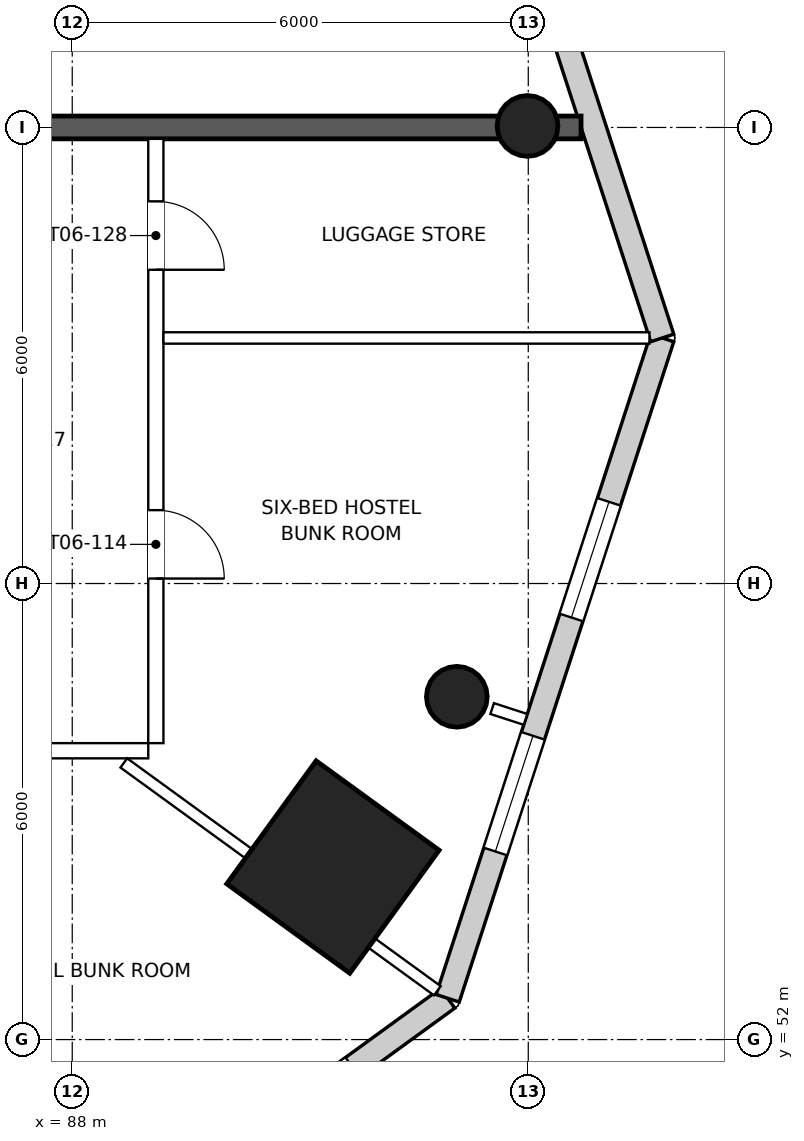
"""IFC4 building model, lengths in metres.
Left out: names, types, materials, properties, quantities, classifications, styles, units other than length and angle.
Written with IfcOpenShell. Run it as: python <this file> out.ifc"""

import sys

from ifc_helpers import new_model, si_unit, direction, frame, frame_2d, origin, origin_2d, place, context, subcontext, project, spatial, rectangle, circle, extrude, element, fill, save


model = new_model("IFC4")
c1 = context("Model", 3, precision=1e-05, world=origin(), true_north=direction((0.0, 1.0)))
c2 = subcontext(c1, "Body", "Model", "MODEL_VIEW")
j1 = project(units=[si_unit("LENGTHUNIT", "METRE"), si_unit("PLANEANGLEUNIT", "RADIAN")], contexts=[c1])
p1 = place(None, origin())
s1 = spatial("IfcSite", under=j1, at=p1, CompositionType="ELEMENT")
p2 = place(p1, origin())
s2 = spatial("IfcBuilding", under=s1, at=p2, CompositionType="ELEMENT")
p3 = place(p2, frame((0.0, 0.0, 98.6)))
s3 = spatial("IfcBuildingStorey", under=s2, at=p3, CompositionType="ELEMENT", Elevation=98.6)
p4 = place(p3, frame((91.43, 54.27, 0.0), z_axis=(0.0, 0.0, 1.0), x_axis=(0.809016994375, -0.587785252292, 0.0)))
e1 = element("IfcColumn", 1, at=p4, inside=s3, PredefinedType="COLUMN", context=c2, shape_type="SweptSolid", body=[
    extrude(rectangle(XDim=2.0, YDim=2.0, at=origin_2d()), origin(), (0.0, 0.0, 1.0), 3.9),
])
for number, where, z_axis, x_axis in (
    (2, (93.06, 56.51, 0.0), (0.0, 0.0, 1.0), (1.0, 0.0, 0.0)),
    (3, (93.99, 64.02, 0.0), (0.0, 0.0, 1.0), (1.0, 0.0, 0.0)),
):
    element("IfcColumn", number, at=place(p3, frame(where, z_axis=z_axis, x_axis=x_axis)), inside=s3, PredefinedType="COLUMN", context=c2, shape_type="SweptSolid", body=[
        extrude(circle(Radius=0.4, at=origin_2d()), origin(), (0.0, 0.0, 1.0), 3.9),
    ])
p5 = place(p3, frame((74.663, 39.264, 0.0), z_axis=(0.0, 0.0, 1.0), x_axis=(0.809012643171, 0.587791241165, 0.0)))
e4 = element("IfcWall", 4, at=p5, inside=s3, PredefinedType="SOLIDWALL", context=c2, shape_type="SweptSolid", body=[
    extrude(rectangle(XDim=22.592, YDim=0.32, at=frame_2d((11.296, 0.0))), origin(), (0.0, 0.0, 1.0), 3.6),
])
p6 = place(p5, frame((1.546, 0.0, 0.9)))
e5 = element("IfcOpeningElement", 5, at=p6, cuts=e4, PredefinedType="OPENING", context=c2, shape_type="SweptSolid", body=[
    extrude(rectangle(XDim=1.5, YDim=1.8, at=frame_2d((0.75, 0.9))), frame((0.0, 0.17, 0.0), z_axis=(0.0, -1.0, 0.0), x_axis=(1.0, 0.0, 0.0)), (0.0, 0.0, 1.0), 0.34),
])
p7 = place(p5, frame((4.546, 0.0, 0.9)))
e6 = element("IfcOpeningElement", 6, at=p7, cuts=e4, PredefinedType="OPENING", context=c2, shape_type="SweptSolid", body=[
    extrude(rectangle(XDim=1.5, YDim=1.8, at=frame_2d((0.75, 0.9))), frame((0.0, 0.17, 0.0), z_axis=(0.0, -1.0, 0.0), x_axis=(1.0, 0.0, 0.0)), (0.0, 0.0, 1.0), 0.34),
])
p8 = place(p5, frame((7.546, 0.0, 0.9)))
e7 = element("IfcOpeningElement", 7, at=p8, cuts=e4, PredefinedType="OPENING", context=c2, shape_type="SweptSolid", body=[
    extrude(rectangle(XDim=1.5, YDim=1.8, at=frame_2d((0.75, 0.9))), frame((0.0, 0.17, 0.0), z_axis=(0.0, -1.0, 0.0), x_axis=(1.0, 0.0, 0.0)), (0.0, 0.0, 1.0), 0.34),
])
p9 = place(p5, frame((10.546, 0.0, 0.9)))
e8 = element("IfcOpeningElement", 8, at=p9, cuts=e4, PredefinedType="OPENING", context=c2, shape_type="SweptSolid", body=[
    extrude(rectangle(XDim=1.5, YDim=1.8, at=frame_2d((0.75, 0.9))), frame((0.0, 0.17, 0.0), z_axis=(0.0, -1.0, 0.0), x_axis=(1.0, 0.0, 0.0)), (0.0, 0.0, 1.0), 0.34),
])
p10 = place(p5, frame((13.546, 0.0, 0.9)))
e9 = element("IfcOpeningElement", 9, at=p10, cuts=e4, PredefinedType="OPENING", context=c2, shape_type="SweptSolid", body=[
    extrude(rectangle(XDim=1.5, YDim=1.8, at=frame_2d((0.75, 0.9))), frame((0.0, 0.17, 0.0), z_axis=(0.0, -1.0, 0.0), x_axis=(1.0, 0.0, 0.0)), (0.0, 0.0, 1.0), 0.34),
])
p11 = place(p5, frame((16.546, 0.0, 0.9)))
e10 = element("IfcOpeningElement", 10, at=p11, cuts=e4, PredefinedType="OPENING", context=c2, shape_type="SweptSolid", body=[
    extrude(rectangle(XDim=1.5, YDim=1.8, at=frame_2d((0.75, 0.9))), frame((0.0, 0.17, 0.0), z_axis=(0.0, -1.0, 0.0), x_axis=(1.0, 0.0, 0.0)), (0.0, 0.0, 1.0), 0.34),
])
p12 = place(p5, frame((19.546, 0.0, 0.9)))
e11 = element("IfcOpeningElement", 11, at=p12, cuts=e4, PredefinedType="OPENING", context=c2, shape_type="SweptSolid", body=[
    extrude(rectangle(XDim=1.5, YDim=1.8, at=frame_2d((0.75, 0.9))), frame((0.0, 0.17, 0.0), z_axis=(0.0, -1.0, 0.0), x_axis=(1.0, 0.0, 0.0)), (0.0, 0.0, 1.0), 0.34),
])
p13 = place(p3, frame((92.94, 52.543, 0.0), z_axis=(0.0, 0.0, 1.0), x_axis=(0.309026240246, 0.95105351208, 0.0)))
e12 = element("IfcWall", 12, at=p13, inside=s3, PredefinedType="SOLIDWALL", context=c2, shape_type="SweptSolid", body=[
    extrude(rectangle(XDim=9.134, YDim=0.32, at=frame_2d((4.567, 0.0))), origin(), (0.0, 0.0, 1.0), 3.6),
])
p14 = place(p13, frame((2.031, 0.0, 0.9)))
e13 = element("IfcOpeningElement", 13, at=p14, cuts=e12, PredefinedType="OPENING", context=c2, shape_type="SweptSolid", body=[
    extrude(rectangle(XDim=1.6, YDim=1.8, at=frame_2d((0.8, 0.9))), frame((0.0, 0.17, 0.0), z_axis=(0.0, -1.0, 0.0), x_axis=(1.0, 0.0, 0.0)), (0.0, 0.0, 1.0), 0.34),
])
p15 = place(p13, frame((5.267, 0.0, 0.9)))
e14 = element("IfcOpeningElement", 14, at=p15, cuts=e12, PredefinedType="OPENING", context=c2, shape_type="SweptSolid", body=[
    extrude(rectangle(XDim=1.6, YDim=1.8, at=frame_2d((0.8, 0.9))), frame((0.0, 0.17, 0.0), z_axis=(0.0, -1.0, 0.0), x_axis=(1.0, 0.0, 0.0)), (0.0, 0.0, 1.0), 0.34),
])
p16 = place(p3, frame((95.762, 61.231, 0.0), z_axis=(0.0, 0.0, 1.0), x_axis=(-0.309018577053, 0.95105600205, 0.0)))
e15 = element("IfcWall", 15, at=p16, inside=s3, PredefinedType="SOLIDWALL", context=c2, shape_type="SweptSolid", body=[
    extrude(rectangle(XDim=22.247, YDim=0.32, at=frame_2d((11.124, 0.0))), origin(), (0.0, 0.0, 1.0), 3.6),
])
p17 = place(p16, frame((4.374, 0.0, 0.9)))
e16 = element("IfcOpeningElement", 16, at=p17, cuts=e15, PredefinedType="OPENING", context=c2, shape_type="SweptSolid", body=[
    extrude(rectangle(XDim=1.5, YDim=1.8, at=frame_2d((0.75, 0.9))), frame((0.0, 0.17, 0.0), z_axis=(0.0, -1.0, 0.0), x_axis=(1.0, 0.0, 0.0)), (0.0, 0.0, 1.0), 0.34),
])
p18 = place(p16, frame((7.374, 0.0, 0.9)))
e17 = element("IfcOpeningElement", 17, at=p18, cuts=e15, PredefinedType="OPENING", context=c2, shape_type="SweptSolid", body=[
    extrude(rectangle(XDim=1.5, YDim=1.8, at=frame_2d((0.75, 0.9))), frame((0.0, 0.17, 0.0), z_axis=(0.0, -1.0, 0.0), x_axis=(1.0, 0.0, 0.0)), (0.0, 0.0, 1.0), 0.34),
])
p19 = place(p16, frame((10.374, 0.0, 0.9)))
e18 = element("IfcOpeningElement", 18, at=p19, cuts=e15, PredefinedType="OPENING", context=c2, shape_type="SweptSolid", body=[
    extrude(rectangle(XDim=1.5, YDim=1.8, at=frame_2d((0.75, 0.9))), frame((0.0, 0.17, 0.0), z_axis=(0.0, -1.0, 0.0), x_axis=(1.0, 0.0, 0.0)), (0.0, 0.0, 1.0), 0.34),
])
p20 = place(p16, frame((13.374, 0.0, 0.9)))
e19 = element("IfcOpeningElement", 19, at=p20, cuts=e15, PredefinedType="OPENING", context=c2, shape_type="SweptSolid", body=[
    extrude(rectangle(XDim=1.5, YDim=1.8, at=frame_2d((0.75, 0.9))), frame((0.0, 0.17, 0.0), z_axis=(0.0, -1.0, 0.0), x_axis=(1.0, 0.0, 0.0)), (0.0, 0.0, 1.0), 0.34),
])
p21 = place(p16, frame((16.374, 0.0, 0.9)))
e20 = element("IfcOpeningElement", 20, at=p21, cuts=e15, PredefinedType="OPENING", context=c2, shape_type="SweptSolid", body=[
    extrude(rectangle(XDim=1.5, YDim=1.8, at=frame_2d((0.75, 0.9))), frame((0.0, 0.17, 0.0), z_axis=(0.0, -1.0, 0.0), x_axis=(1.0, 0.0, 0.0)), (0.0, 0.0, 1.0), 0.34),
])
p22 = place(p16, frame((19.374, 0.0, 0.9)))
e21 = element("IfcOpeningElement", 21, at=p22, cuts=e15, PredefinedType="OPENING", context=c2, shape_type="SweptSolid", body=[
    extrude(rectangle(XDim=1.5, YDim=1.8, at=frame_2d((0.75, 0.9))), frame((0.0, 0.17, 0.0), z_axis=(0.0, -1.0, 0.0), x_axis=(1.0, 0.0, 0.0)), (0.0, 0.0, 1.0), 0.34),
])
p23 = place(p3, frame((45.306, 64.0, 0.0), z_axis=(0.0, 0.0, 1.0), x_axis=(1.0, 0.0, 0.0)))
e22 = element("IfcWall", 22, at=p23, inside=s3, PredefinedType="PARTITIONING", context=c2, shape_type="SweptSolid", body=[
    extrude(rectangle(XDim=49.389, YDim=0.3, at=frame_2d((24.694, 0.0))), origin(), (0.0, 0.0, 1.0), 2.9),
])
p24 = place(p23, frame((16.331, 0.0, 0.0)))
e23 = element("IfcOpeningElement", 23, at=p24, cuts=e22, PredefinedType="OPENING", context=c2, shape_type="SweptSolid", body=[
    extrude(rectangle(XDim=2.0, YDim=2.1, at=frame_2d((1.0, 1.05))), frame((0.0, 0.16, 0.0), z_axis=(0.0, -1.0, 0.0), x_axis=(1.0, 0.0, 0.0)), (0.0, 0.0, 1.0), 0.32),
])
p25 = place(p23, frame((31.058, 0.0, 0.0)))
e24 = element("IfcOpeningElement", 24, at=p25, cuts=e22, PredefinedType="OPENING", context=c2, shape_type="SweptSolid", body=[
    extrude(rectangle(XDim=2.0, YDim=2.1, at=frame_2d((1.0, 1.05))), frame((0.0, 0.16, 0.0), z_axis=(0.0, -1.0, 0.0), x_axis=(1.0, 0.0, 0.0)), (0.0, 0.0, 1.0), 0.32),
])
p26 = place(p3, frame((89.1, 63.85, 0.0), z_axis=(0.0, 0.0, 1.0), x_axis=(0.0, -1.0, 0.0)))
e25 = element("IfcWall", 25, at=p26, inside=s3, PredefinedType="PARTITIONING", context=c2, shape_type="SweptSolid", body=[
    extrude(rectangle(XDim=7.95, YDim=0.2, at=frame_2d((3.975, 0.0))), origin(), (0.0, 0.0, 1.0), 3.6),
])
p27 = place(p26, frame((4.885, 0.0, 0.0)))
e26 = element("IfcOpeningElement", 26, at=p27, cuts=e25, PredefinedType="OPENING", context=c2, shape_type="SweptSolid", body=[
    extrude(rectangle(XDim=0.9, YDim=2.1, at=frame_2d((0.45, 1.05))), frame((0.0, 0.11, 0.0), z_axis=(0.0, -1.0, 0.0), x_axis=(1.0, 0.0, 0.0)), (0.0, 0.0, 1.0), 0.22),
])
p28 = place(p26, frame((0.822, 0.0, 0.0)))
e27 = element("IfcOpeningElement", 27, at=p28, cuts=e25, PredefinedType="OPENING", context=c2, shape_type="SweptSolid", body=[
    extrude(rectangle(XDim=0.9, YDim=2.1, at=frame_2d((0.45, 1.05))), frame((0.0, 0.11, 0.0), z_axis=(0.0, -1.0, 0.0), x_axis=(1.0, 0.0, 0.0)), (0.0, 0.0, 1.0), 0.22),
])
p29 = place(p3, frame((89.0, 55.8, 0.0), z_axis=(0.0, 0.0, 1.0), x_axis=(-1.0, 0.0, 0.0)))
e28 = element("IfcWall", 28, at=p29, inside=s3, PredefinedType="PARTITIONING", context=c2, shape_type="SweptSolid", body=[
    extrude(rectangle(XDim=7.946, YDim=0.2, at=frame_2d((3.973, 0.0))), origin(), (0.0, 0.0, 1.0), 3.0),
])
p30 = place(p29, frame((3.034, 0.0, 0.0)))
e29 = element("IfcOpeningElement", 29, at=p30, cuts=e28, PredefinedType="OPENING", context=c2, shape_type="SweptSolid", body=[
    extrude(rectangle(XDim=0.9, YDim=2.1, at=frame_2d((0.45, 1.05))), frame((0.0, 0.11, 0.0), z_axis=(0.0, -1.0, 0.0), x_axis=(1.0, 0.0, 0.0)), (0.0, 0.0, 1.0), 0.22),
])
p31 = place(p3, frame((92.804, 52.642, 0.0), z_axis=(0.0, 0.0, 1.0), x_axis=(-0.809009310944, 0.587795827483, 0.0)))
e30 = element("IfcWall", 30, at=p31, inside=s3, PredefinedType="PARTITIONING", context=c2, shape_type="SweptSolid", body=[
    extrude(rectangle(XDim=5.099, YDim=0.15, at=frame_2d((2.549, 0.0))), origin(), (0.0, 0.0, 1.0), 3.6),
])
p32 = place(p3, frame((95.594, 61.231, 0.0), z_axis=(0.0, 0.0, 1.0), x_axis=(-1.0, 0.0, 0.0)))
e31 = element("IfcWall", 31, at=p32, inside=s3, PredefinedType="PARTITIONING", context=c2, shape_type="SweptSolid", body=[
    extrude(rectangle(XDim=6.394, YDim=0.15, at=frame_2d((3.197, 0.0))), origin(), (0.0, 0.0, 1.0), 3.1),
])
p33 = place(p3, frame((93.525, 56.355, 0.0), z_axis=(0.0, 0.0, 1.0), x_axis=(0.951037957901, -0.309074105406, 0.0)))
e32 = element("IfcWall", 32, at=p33, inside=s3, PredefinedType="PARTITIONING", context=c2, shape_type="SweptSolid", body=[
    extrude(rectangle(XDim=0.461, YDim=0.15, at=frame_2d((0.231, 0.0))), origin(), (0.0, 0.0, 1.0), 3.6),
])
p34 = place(p14, origin())
e33 = element("IfcWindow", 33, at=p34, inside=s3, PartitioningType="SINGLE_PANEL", PredefinedType="WINDOW", context=c2, shape_type="SweptSolid", body=[
    extrude(rectangle(XDim=1.6, YDim=1.8, at=frame_2d((0.8, 0.9))), frame((0.0, 0.07, 0.0), z_axis=(0.0, -1.0, 0.0), x_axis=(1.0, 0.0, 0.0)), (0.0, 0.0, 1.0), 0.06),
])
fill(e13, e33)
p35 = place(p15, origin())
e34 = element("IfcWindow", 34, at=p35, inside=s3, PartitioningType="SINGLE_PANEL", PredefinedType="WINDOW", context=c2, shape_type="SweptSolid", body=[
    extrude(rectangle(XDim=1.6, YDim=1.8, at=frame_2d((0.8, 0.9))), frame((0.0, 0.07, 0.0), z_axis=(0.0, -1.0, 0.0), x_axis=(1.0, 0.0, 0.0)), (0.0, 0.0, 1.0), 0.06),
])
fill(e14, e34)
p36 = place(p27, origin())
e35 = element("IfcDoor", 35, at=p36, inside=s3, OperationType="SINGLE_SWING_RIGHT", PredefinedType="DOOR", context=c2, shape_type="SweptSolid", body=[
    extrude(rectangle(XDim=0.9, YDim=2.1, at=frame_2d((0.45, 1.05))), frame((0.0, 0.025, 0.0), z_axis=(0.0, -1.0, 0.0), x_axis=(1.0, 0.0, 0.0)), (0.0, 0.0, 1.0), 0.05),
])
fill(e26, e35)
p37 = place(p28, origin())
e36 = element("IfcDoor", 36, at=p37, inside=s3, OperationType="SINGLE_SWING_RIGHT", PredefinedType="DOOR", context=c2, shape_type="SweptSolid", body=[
    extrude(rectangle(XDim=0.9, YDim=2.1, at=frame_2d((0.45, 1.05))), frame((0.0, 0.025, 0.0), z_axis=(0.0, -1.0, 0.0), x_axis=(1.0, 0.0, 0.0)), (0.0, 0.0, 1.0), 0.05),
])
fill(e27, e36)
save(model, sys.argv[1])
